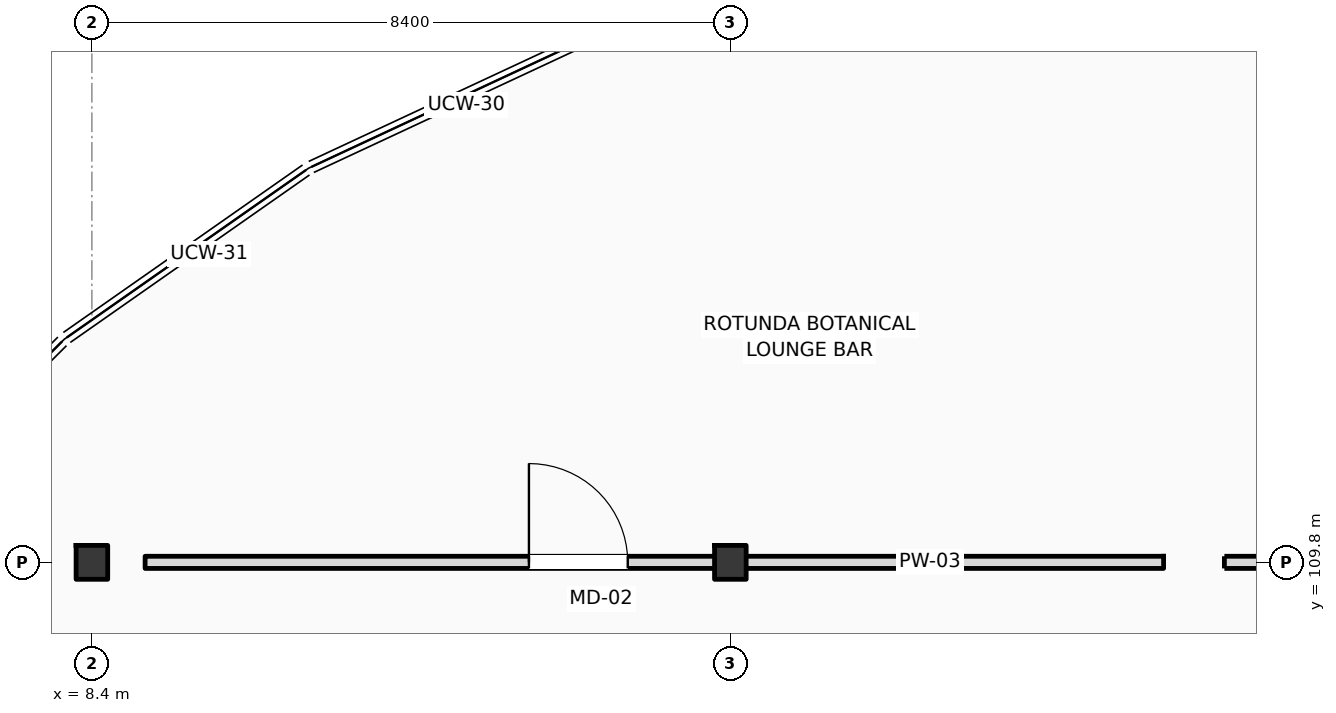
"""IFC4 building model, lengths in metres.
Left out: names, types, materials, properties, quantities, classifications, styles, units other than length and angle.
Written with IfcOpenShell. Run it as: python <this file> out.ifc"""

import sys

from ifc_helpers import new_model, si_unit, direction, frame, frame_2d, origin, origin_2d, place, context, subcontext, project, spatial, rectangle, i_section, extrude, element, fill, save


model = new_model("IFC4")
c1 = context("Model", 3, precision=1e-05, world=origin(), true_north=direction((0.0, 1.0)))
c2 = subcontext(c1, "Body", "Model", "MODEL_VIEW")
j1 = project(units=[si_unit("LENGTHUNIT", "METRE"), si_unit("PLANEANGLEUNIT", "RADIAN")], contexts=[c1])
p1 = place(None, origin())
s1 = spatial("IfcSite", under=j1, at=p1, CompositionType="ELEMENT")
p2 = place(p1, origin())
s2 = spatial("IfcBuilding", under=s1, at=p2, CompositionType="ELEMENT")
p3 = place(p2, origin())
s3 = spatial("IfcBuildingStorey", under=s2, at=p3, CompositionType="ELEMENT", Elevation=0.0)
for number, where, z_axis, x_axis in (
    (1, (8.4, 109.8, 0.0), (0.0, 0.0, 1.0), (1.0, 0.0, 0.0)),
    (2, (16.8, 109.8, 0.0), (0.0, 0.0, 1.0), (1.0, 0.0, 0.0)),
):
    element("IfcColumn", number, at=place(p3, frame(where, z_axis=z_axis, x_axis=x_axis)), inside=s3, PredefinedType="COLUMN", context=c2, shape_type="SweptSolid", body=[
        extrude(i_section(OverallWidth=0.416, OverallDepth=0.446, WebThickness=0.036, FlangeThickness=0.048, FilletRadius=0.015, at=origin_2d()), origin(), (0.0, 0.0, 1.0), 6.0),
    ])
p4 = place(p3, frame((23.3, 109.8, 0.0), z_axis=(0.0, 0.0, 1.0), x_axis=(1.0, 0.0, 0.0)))
e3 = element("IfcWall", 3, at=p4, inside=s3, PredefinedType="PARTITIONING", context=c2, shape_type="SweptSolid", body=[
    extrude(rectangle(XDim=40.8, YDim=0.16, at=frame_2d((20.4, 0.0))), origin(), (0.0, 0.0, 1.0), 5.14),
])
p5 = place(p4, frame((19.4, 0.0, 0.0)))
e4 = element("IfcOpeningElement", 4, at=p5, cuts=e3, PredefinedType="OPENING", context=c2, shape_type="SweptSolid", body=[
    extrude(rectangle(XDim=2.0, YDim=2.5, at=frame_2d((1.0, 1.25))), frame((0.0, 0.09, 0.0), z_axis=(0.0, -1.0, 0.0), x_axis=(1.0, 0.0, 0.0)), (0.0, 0.0, 1.0), 0.18),
])
p6 = place(p3, frame((9.1, 109.8, 0.0), z_axis=(0.0, 0.0, 1.0), x_axis=(1.0, 0.0, 0.0)))
e5 = element("IfcWall", 5, at=p6, inside=s3, PredefinedType="PARTITIONING", context=c2, shape_type="SweptSolid", body=[
    extrude(rectangle(XDim=13.4, YDim=0.16, at=frame_2d((6.7, 0.0))), origin(), (0.0, 0.0, 1.0), 5.14),
])
p7 = place(p6, frame((5.05, 0.0, 0.0)))
e6 = element("IfcOpeningElement", 6, at=p7, cuts=e5, PredefinedType="OPENING", context=c2, shape_type="SweptSolid", body=[
    extrude(rectangle(XDim=1.3, YDim=2.2, at=frame_2d((0.65, 1.1))), frame((0.0, 0.09, 0.0), z_axis=(0.0, -1.0, 0.0), x_axis=(1.0, 0.0, 0.0)), (0.0, 0.0, 1.0), 0.18),
])
p8 = place(p7, origin())
e7 = element("IfcDoor", 7, at=p8, inside=s3, OperationType="SINGLE_SWING_LEFT", PredefinedType="DOOR", context=c2, shape_type="SweptSolid", body=[
    extrude(rectangle(XDim=1.3, YDim=2.2, at=frame_2d((0.65, 1.1))), frame((0.0, 0.025, 0.0), z_axis=(0.0, -1.0, 0.0), x_axis=(1.0, 0.0, 0.0)), (0.0, 0.0, 1.0), 0.05),
])
fill(e6, e7)
save(model, sys.argv[1])
